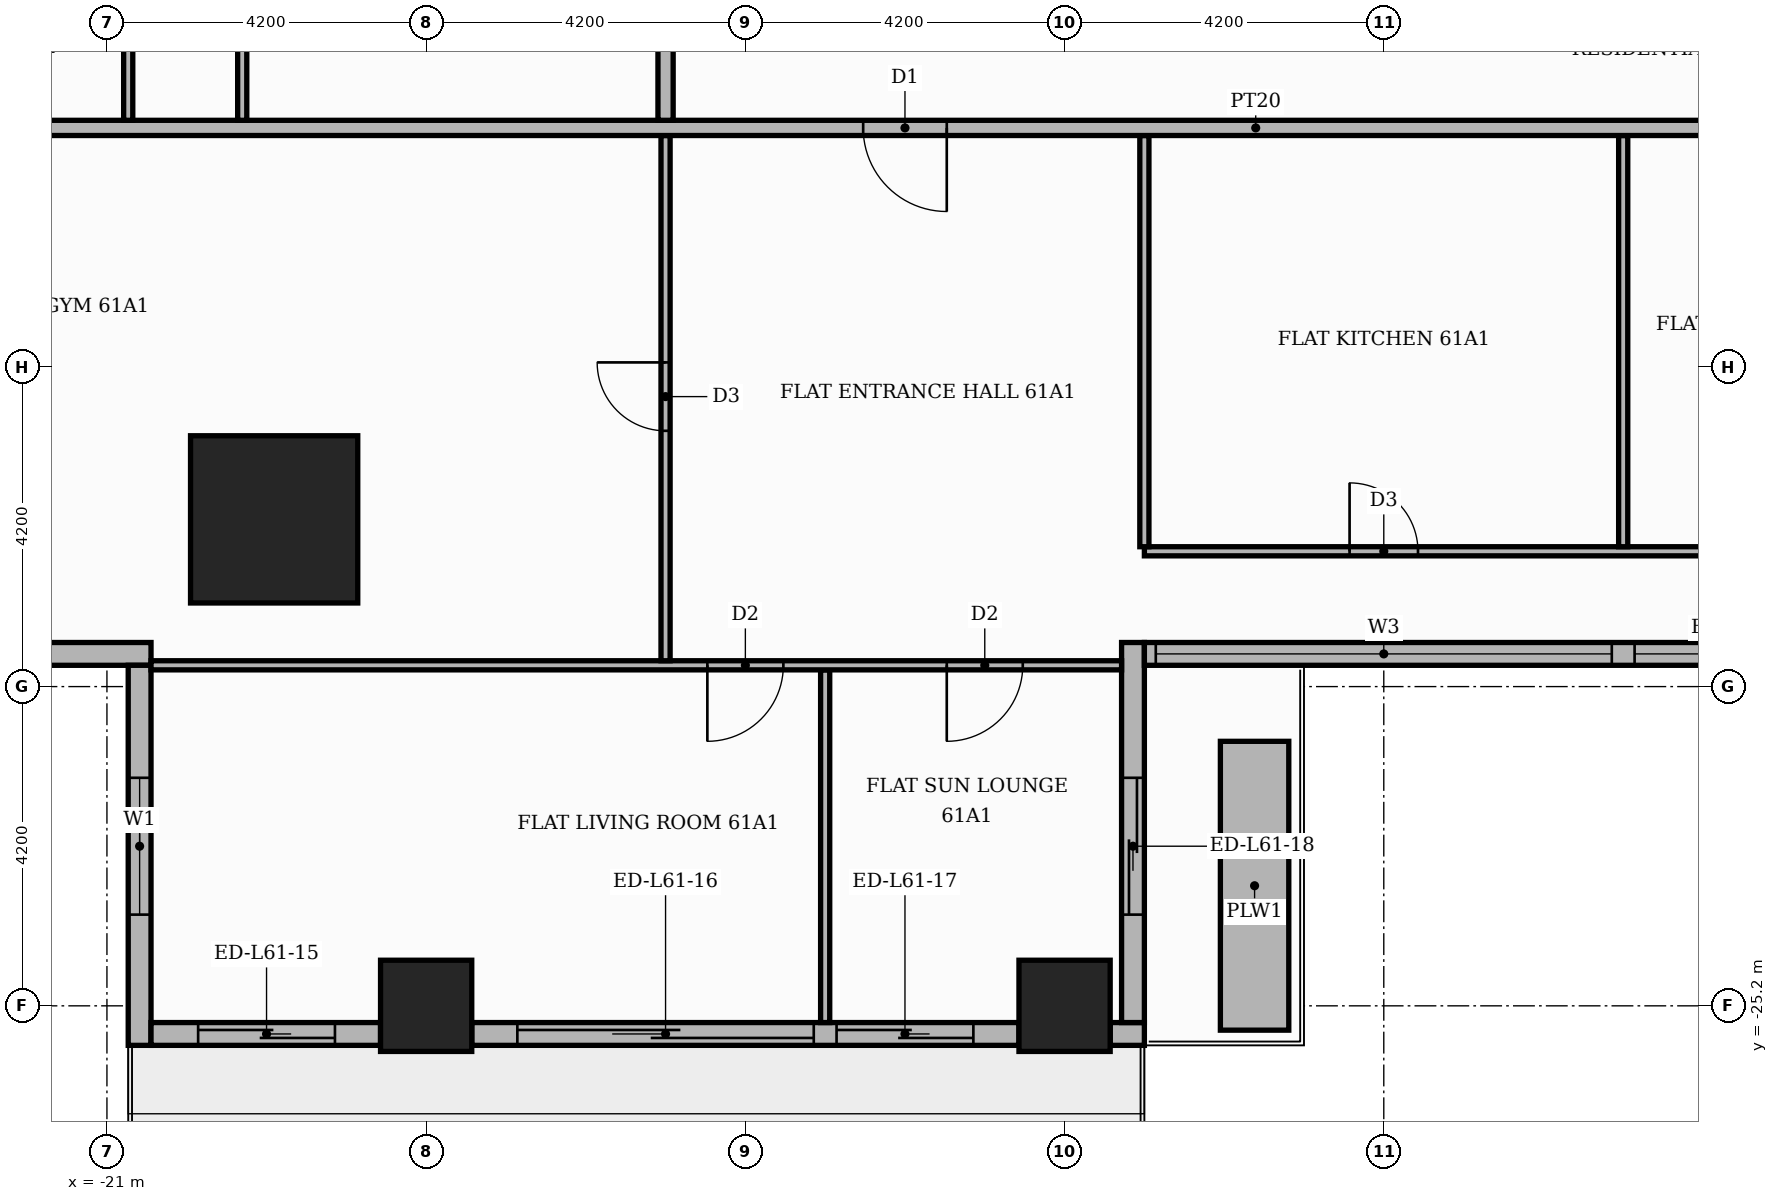
"""IFC4 building model, lengths in metres.
Left out: names, types, materials, properties, quantities, classifications, styles, units other than length and angle.
Written with IfcOpenShell. Run it as: python <this file> out.ifc"""

import sys

from ifc_helpers import new_model, si_unit, direction, frame, frame_2d, origin, origin_2d, place, context, subcontext, project, spatial, rectangle, extrude, element, fill, save


model = new_model("IFC4")
c1 = context("Model", 3, precision=1e-05, world=origin(), true_north=direction((0.0, 1.0)))
c2 = subcontext(c1, "Body", "Model", "MODEL_VIEW")
j1 = project(units=[si_unit("LENGTHUNIT", "METRE"), si_unit("PLANEANGLEUNIT", "RADIAN")], contexts=[c1])
p1 = place(None, origin())
s1 = spatial("IfcSite", under=j1, at=p1, CompositionType="ELEMENT")
p2 = place(p1, origin())
s2 = spatial("IfcBuilding", under=s1, at=p2, CompositionType="ELEMENT")
p3 = place(p2, frame((0.0, 0.0, 256.2)))
s3 = spatial("IfcBuildingStorey", under=s2, at=p3, CompositionType="ELEMENT", Elevation=256.2)
p4 = place(p3, frame((-18.8, -18.8, 0.0), z_axis=(0.0, 0.0, 1.0), x_axis=(1.0, 0.0, 0.0)))
e1 = element("IfcColumn", 1, at=p4, inside=s3, PredefinedType="COLUMN", context=c2, shape_type="SweptSolid", body=[
    extrude(rectangle(XDim=2.2, YDim=2.2, at=origin_2d()), origin(), (0.0, 0.0, 1.0), 3.9),
])
for number, where, z_axis, x_axis in (
    (2, (-8.4, -25.2, 0.0), (0.0, 0.0, 1.0), (1.0, 0.0, 0.0)),
    (3, (-16.8, -25.2, 0.0), (0.0, 0.0, 1.0), (1.0, 0.0, 0.0)),
):
    element("IfcColumn", number, at=place(p3, frame(where, z_axis=z_axis, x_axis=x_axis)), inside=s3, PredefinedType="COLUMN", context=c2, shape_type="SweptSolid", body=[
        extrude(rectangle(XDim=1.2, YDim=1.2, at=origin_2d()), origin(), (0.0, 0.0, 1.0), 3.9),
    ])
p5 = place(p3, frame((-25.42, -20.57, 0.0), z_axis=(0.0, 0.0, 1.0), x_axis=(1.0, 0.0, 0.0)))
e4 = element("IfcWall", 4, at=p5, inside=s3, PredefinedType="STANDARD", context=c2, shape_type="SweptSolid", body=[
    extrude(rectangle(XDim=5.0, YDim=0.3, at=frame_2d((2.5, 0.0))), origin(), (0.0, 0.0, 1.0), 3.48),
])
p6 = place(p5, frame((1.42, 0.0, 0.9)))
e5 = element("IfcOpeningElement", 5, at=p6, cuts=e4, PredefinedType="OPENING", context=c2, shape_type="SweptSolid", body=[
    extrude(rectangle(XDim=1.8, YDim=2.1, at=frame_2d((0.9, 1.05))), frame((0.0, 0.16, 0.0), z_axis=(0.0, -1.0, 0.0), x_axis=(1.0, 0.0, 0.0)), (0.0, 0.0, 1.0), 0.32),
])
p7 = place(p3, frame((-20.57, -20.72, 0.0), z_axis=(0.0, 0.0, 1.0), x_axis=(0.0, -1.0, 0.0)))
e6 = element("IfcWall", 6, at=p7, inside=s3, PredefinedType="STANDARD", context=c2, shape_type="SweptSolid", body=[
    extrude(rectangle(XDim=5.0, YDim=0.3, at=frame_2d((2.5, 0.0))), origin(), (0.0, 0.0, 1.0), 3.48),
])
p8 = place(p7, frame((1.48, 0.0, 0.9)))
e7 = element("IfcOpeningElement", 7, at=p8, cuts=e6, PredefinedType="OPENING", context=c2, shape_type="SweptSolid", body=[
    extrude(rectangle(XDim=1.8, YDim=2.1, at=frame_2d((0.9, 1.05))), frame((0.0, 0.16, 0.0), z_axis=(0.0, -1.0, 0.0), x_axis=(1.0, 0.0, 0.0)), (0.0, 0.0, 1.0), 0.32),
])
p9 = place(p3, frame((-20.42, -25.57, 0.0), z_axis=(0.0, 0.0, 1.0), x_axis=(1.0, 0.0, 0.0)))
e8 = element("IfcWall", 8, at=p9, inside=s3, PredefinedType="STANDARD", context=c2, shape_type="SweptSolid", body=[
    extrude(rectangle(XDim=3.02, YDim=0.3, at=frame_2d((1.51, 0.0))), origin(), (0.0, 0.0, 1.0), 3.48),
])
p10 = place(p9, frame((0.62, 0.0, 0.0)))
e9 = element("IfcOpeningElement", 9, at=p10, cuts=e8, PredefinedType="OPENING", context=c2, shape_type="SweptSolid", body=[
    extrude(rectangle(XDim=1.8, YDim=2.4, at=frame_2d((0.9, 1.2))), frame((0.0, 0.16, 0.0), z_axis=(0.0, -1.0, 0.0), x_axis=(1.0, 0.0, 0.0)), (0.0, 0.0, 1.0), 0.32),
])
p11 = place(p3, frame((-16.2, -25.57, 0.0), z_axis=(0.0, 0.0, 1.0), x_axis=(1.0, 0.0, 0.0)))
e10 = element("IfcWall", 10, at=p11, inside=s3, PredefinedType="STANDARD", context=c2, shape_type="SweptSolid", body=[
    extrude(rectangle(XDim=7.2, YDim=0.3, at=frame_2d((3.6, 0.0))), origin(), (0.0, 0.0, 1.0), 3.48),
])
p12 = place(p11, frame((0.6, 0.0, 0.0)))
e11 = element("IfcOpeningElement", 11, at=p12, cuts=e10, PredefinedType="OPENING", context=c2, shape_type="SweptSolid", body=[
    extrude(rectangle(XDim=3.9, YDim=2.4, at=frame_2d((1.95, 1.2))), frame((0.0, 0.16, 0.0), z_axis=(0.0, -1.0, 0.0), x_axis=(1.0, 0.0, 0.0)), (0.0, 0.0, 1.0), 0.32),
])
p13 = place(p11, frame((4.8, 0.0, 0.0)))
e12 = element("IfcOpeningElement", 12, at=p13, cuts=e10, PredefinedType="OPENING", context=c2, shape_type="SweptSolid", body=[
    extrude(rectangle(XDim=1.8, YDim=2.4, at=frame_2d((0.9, 1.2))), frame((0.0, 0.16, 0.0), z_axis=(0.0, -1.0, 0.0), x_axis=(1.0, 0.0, 0.0)), (0.0, 0.0, 1.0), 0.32),
])
p14 = place(p3, frame((-7.8, -25.57, 0.0), z_axis=(0.0, 0.0, 1.0), x_axis=(1.0, 0.0, 0.0)))
e13 = element("IfcWall", 13, at=p14, inside=s3, PredefinedType="STANDARD", context=c2, shape_type="SweptSolid", body=[
    extrude(rectangle(XDim=0.45, YDim=0.3, at=frame_2d((0.225, 0.0))), origin(), (0.0, 0.0, 1.0), 3.48),
])
p15 = place(p3, frame((-7.5, -25.42, 0.0), z_axis=(0.0, 0.0, 1.0), x_axis=(0.0, 1.0, 0.0)))
e14 = element("IfcWall", 14, at=p15, inside=s3, PredefinedType="STANDARD", context=c2, shape_type="SweptSolid", body=[
    extrude(rectangle(XDim=5.0, YDim=0.3, at=frame_2d((2.5, 0.0))), origin(), (0.0, 0.0, 1.0), 3.48),
])
p16 = place(p15, frame((1.42, 0.0, 0.0)))
e15 = element("IfcOpeningElement", 15, at=p16, cuts=e14, PredefinedType="OPENING", context=c2, shape_type="SweptSolid", body=[
    extrude(rectangle(XDim=1.8, YDim=2.4, at=frame_2d((0.9, 1.2))), frame((0.0, 0.16, 0.0), z_axis=(0.0, -1.0, 0.0), x_axis=(1.0, 0.0, 0.0)), (0.0, 0.0, 1.0), 0.32),
])
p17 = place(p3, frame((-7.35, -20.57, 0.0), z_axis=(0.0, 0.0, 1.0), x_axis=(1.0, 0.0, 0.0)))
e16 = element("IfcWall", 16, at=p17, inside=s3, PredefinedType="STANDARD", context=c2, shape_type="SweptSolid", body=[
    extrude(rectangle(XDim=15.0, YDim=0.3, at=frame_2d((7.5, 0.0))), origin(), (0.0, 0.0, 1.0), 3.48),
])
p18 = place(p17, frame((0.15, 0.0, 0.9)))
e17 = element("IfcOpeningElement", 17, at=p18, cuts=e16, PredefinedType="OPENING", context=c2, shape_type="SweptSolid", body=[
    extrude(rectangle(XDim=6.0, YDim=2.1, at=frame_2d((3.0, 1.05))), frame((0.0, 0.16, 0.0), z_axis=(0.0, -1.0, 0.0), x_axis=(1.0, 0.0, 0.0)), (0.0, 0.0, 1.0), 0.32),
])
p19 = place(p17, frame((6.45, 0.0, 0.9)))
e18 = element("IfcOpeningElement", 18, at=p19, cuts=e16, PredefinedType="OPENING", context=c2, shape_type="SweptSolid", body=[
    extrude(rectangle(XDim=6.0, YDim=2.1, at=frame_2d((3.0, 1.05))), frame((0.0, 0.16, 0.0), z_axis=(0.0, -1.0, 0.0), x_axis=(1.0, 0.0, 0.0)), (0.0, 0.0, 1.0), 0.32),
])
p20 = place(p17, frame((12.75, 0.0, 0.9)))
e19 = element("IfcOpeningElement", 19, at=p20, cuts=e16, PredefinedType="OPENING", context=c2, shape_type="SweptSolid", body=[
    extrude(rectangle(XDim=1.8, YDim=2.1, at=frame_2d((0.9, 1.05))), frame((0.0, 0.16, 0.0), z_axis=(0.0, -1.0, 0.0), x_axis=(1.0, 0.0, 0.0)), (0.0, 0.0, 1.0), 0.32),
])
p21 = place(p3, frame((-5.9, -25.52, 0.0), z_axis=(0.0, 0.0, 1.0), x_axis=(0.0, 1.0, 0.0)))
e20 = element("IfcWall", 20, at=p21, inside=s3, PredefinedType="MOVABLE", context=c2, shape_type="SweptSolid", body=[
    extrude(rectangle(XDim=3.8, YDim=0.9, at=frame_2d((1.9, 0.0))), origin(), (0.0, 0.0, 1.0), 0.6),
])
p22 = place(p3, frame((-11.55, -25.42, 0.0), z_axis=(0.0, 0.0, 1.0), x_axis=(0.0, 1.0, 0.0)))
e21 = element("IfcWall", 21, at=p22, inside=s3, PredefinedType="PARTITIONING", context=c2, shape_type="SweptSolid", body=[
    extrude(rectangle(XDim=4.64, YDim=0.12, at=frame_2d((2.32, 0.0))), origin(), (0.0, 0.0, 1.0), 3.48),
])
p23 = place(p3, frame((-20.42, -20.72, 0.0), z_axis=(0.0, 0.0, 1.0), x_axis=(1.0, 0.0, 0.0)))
e22 = element("IfcWall", 22, at=p23, inside=s3, PredefinedType="PARTITIONING", context=c2, shape_type="SweptSolid", body=[
    extrude(rectangle(XDim=12.77, YDim=0.12, at=frame_2d((6.385, 0.0))), origin(), (0.0, 0.0, 1.0), 3.48),
])
p24 = place(p23, frame((7.32, 0.0, 0.0)))
e23 = element("IfcOpeningElement", 23, at=p24, cuts=e22, PredefinedType="OPENING", context=c2, shape_type="SweptSolid", body=[
    extrude(rectangle(XDim=1.0, YDim=2.1, at=frame_2d((0.5, 1.05))), frame((0.0, 0.07, 0.0), z_axis=(0.0, -1.0, 0.0), x_axis=(1.0, 0.0, 0.0)), (0.0, 0.0, 1.0), 0.14),
])
p25 = place(p23, frame((10.47, 0.0, 0.0)))
e24 = element("IfcOpeningElement", 24, at=p25, cuts=e22, PredefinedType="OPENING", context=c2, shape_type="SweptSolid", body=[
    extrude(rectangle(XDim=1.0, YDim=2.1, at=frame_2d((0.5, 1.05))), frame((0.0, 0.07, 0.0), z_axis=(0.0, -1.0, 0.0), x_axis=(1.0, 0.0, 0.0)), (0.0, 0.0, 1.0), 0.14),
])
p26 = place(p3, frame((-13.65, -20.66, 0.0), z_axis=(0.0, 0.0, 1.0), x_axis=(0.0, 1.0, 0.0)))
e25 = element("IfcWall", 25, at=p26, inside=s3, PredefinedType="PARTITIONING", context=c2, shape_type="SweptSolid", body=[
    extrude(rectangle(XDim=6.91, YDim=0.12, at=frame_2d((3.455, 0.0))), origin(), (0.0, 0.0, 1.0), 3.48),
])
p27 = place(p26, frame((3.025, 0.0, 0.0)))
e26 = element("IfcOpeningElement", 26, at=p27, cuts=e25, PredefinedType="OPENING", context=c2, shape_type="SweptSolid", body=[
    extrude(rectangle(XDim=0.9, YDim=2.1, at=frame_2d((0.45, 1.05))), frame((0.0, 0.07, 0.0), z_axis=(0.0, -1.0, 0.0), x_axis=(1.0, 0.0, 0.0)), (0.0, 0.0, 1.0), 0.14),
])
p28 = place(p3, frame((-7.35, -19.22, 0.0), z_axis=(0.0, 0.0, 1.0), x_axis=(1.0, 0.0, 0.0)))
e27 = element("IfcWall", 27, at=p28, inside=s3, PredefinedType="PARTITIONING", context=c2, shape_type="SweptSolid", body=[
    extrude(rectangle(XDim=20.9, YDim=0.12, at=frame_2d((10.45, 0.0))), origin(), (0.0, 0.0, 1.0), 3.48),
])
p29 = place(p28, frame((2.7, 0.0, 0.0)))
e28 = element("IfcOpeningElement", 28, at=p29, cuts=e27, PredefinedType="OPENING", context=c2, shape_type="SweptSolid", body=[
    extrude(rectangle(XDim=0.9, YDim=2.1, at=frame_2d((0.45, 1.05))), frame((0.0, 0.07, 0.0), z_axis=(0.0, -1.0, 0.0), x_axis=(1.0, 0.0, 0.0)), (0.0, 0.0, 1.0), 0.14),
])
p30 = place(p28, frame((7.95, 0.0, 0.0)))
e29 = element("IfcOpeningElement", 29, at=p30, cuts=e27, PredefinedType="OPENING", context=c2, shape_type="SweptSolid", body=[
    extrude(rectangle(XDim=0.9, YDim=2.1, at=frame_2d((0.45, 1.05))), frame((0.0, 0.07, 0.0), z_axis=(0.0, -1.0, 0.0), x_axis=(1.0, 0.0, 0.0)), (0.0, 0.0, 1.0), 0.14),
])
p31 = place(p28, frame((13.05, 0.0, 0.0)))
e30 = element("IfcOpeningElement", 30, at=p31, cuts=e27, PredefinedType="OPENING", context=c2, shape_type="SweptSolid", body=[
    extrude(rectangle(XDim=0.9, YDim=2.1, at=frame_2d((0.45, 1.05))), frame((0.0, 0.07, 0.0), z_axis=(0.0, -1.0, 0.0), x_axis=(1.0, 0.0, 0.0)), (0.0, 0.0, 1.0), 0.14),
])
p32 = place(p28, frame((17.25, 0.0, 0.0)))
e31 = element("IfcOpeningElement", 31, at=p32, cuts=e27, PredefinedType="OPENING", context=c2, shape_type="SweptSolid", body=[
    extrude(rectangle(XDim=0.9, YDim=2.1, at=frame_2d((0.45, 1.05))), frame((0.0, 0.07, 0.0), z_axis=(0.0, -1.0, 0.0), x_axis=(1.0, 0.0, 0.0)), (0.0, 0.0, 1.0), 0.14),
])
p33 = place(p28, frame((19.5, 0.0, 0.0)))
e32 = element("IfcOpeningElement", 32, at=p33, cuts=e27, PredefinedType="OPENING", context=c2, shape_type="SweptSolid", body=[
    extrude(rectangle(XDim=0.9, YDim=2.1, at=frame_2d((0.45, 1.05))), frame((0.0, 0.07, 0.0), z_axis=(0.0, -1.0, 0.0), x_axis=(1.0, 0.0, 0.0)), (0.0, 0.0, 1.0), 0.14),
])
for number, where, z_axis, x_axis in (
    (33, (-7.35, -19.16, 0.0), (0.0, 0.0, 1.0), (0.0, 1.0, 0.0)),
    (34, (-1.05, -19.16, 0.0), (0.0, 0.0, 1.0), (0.0, 1.0, 0.0)),
):
    element("IfcWall", number, at=place(p3, frame(where, z_axis=z_axis, x_axis=x_axis)), inside=s3, PredefinedType="PARTITIONING", context=c2, shape_type="SweptSolid", body=[
        extrude(rectangle(XDim=5.41, YDim=0.12, at=frame_2d((2.705, 0.0))), origin(), (0.0, 0.0, 1.0), 3.48),
    ])
p34 = place(p3, frame((-25.42, -13.65, 0.0), z_axis=(0.0, 0.0, 1.0), x_axis=(1.0, 0.0, 0.0)))
e35 = element("IfcWall", 35, at=p34, inside=s3, PredefinedType="PARTITIONING", context=c2, shape_type="SweptSolid", body=[
    extrude(rectangle(XDim=39.07, YDim=0.2, at=frame_2d((19.535, 0.0))), origin(), (0.0, 0.0, 1.0), 3.48),
])
p35 = place(p34, frame((14.37, 0.0, 0.0)))
e36 = element("IfcOpeningElement", 36, at=p35, cuts=e35, PredefinedType="OPENING", context=c2, shape_type="SweptSolid", body=[
    extrude(rectangle(XDim=1.1, YDim=2.4, at=frame_2d((0.55, 1.2))), frame((0.0, 0.11, 0.0), z_axis=(0.0, -1.0, 0.0), x_axis=(1.0, 0.0, 0.0)), (0.0, 0.0, 1.0), 0.22),
])
p36 = place(p3, frame((-20.72, -13.55, 0.0), z_axis=(0.0, 0.0, 1.0), x_axis=(0.0, 1.0, 0.0)))
e37 = element("IfcWall", 37, at=p36, inside=s3, PredefinedType="PARTITIONING", context=c2, shape_type="SweptSolid", body=[
    extrude(rectangle(XDim=1.94, YDim=0.12, at=frame_2d((0.97, 0.0))), origin(), (0.0, 0.0, 1.0), 3.48),
])
p37 = place(p3, frame((-19.22, -13.55, 0.0), z_axis=(0.0, 0.0, 1.0), x_axis=(0.0, 1.0, 0.0)))
e38 = element("IfcWall", 38, at=p37, inside=s3, PredefinedType="PARTITIONING", context=c2, shape_type="SweptSolid", body=[
    extrude(rectangle(XDim=4.04, YDim=0.12, at=frame_2d((2.02, 0.0))), origin(), (0.0, 0.0, 1.0), 3.48),
])
p38 = place(p37, frame((1.55, 0.0, 0.0)))
e39 = element("IfcOpeningElement", 39, at=p38, cuts=e38, PredefinedType="OPENING", context=c2, shape_type="SweptSolid", body=[
    extrude(rectangle(XDim=0.9, YDim=2.1, at=frame_2d((0.45, 1.05))), frame((0.0, 0.07, 0.0), z_axis=(0.0, -1.0, 0.0), x_axis=(1.0, 0.0, 0.0)), (0.0, 0.0, 1.0), 0.14),
])
p39 = place(p3, frame((-13.65, -13.55, 0.0), z_axis=(0.0, 0.0, 1.0), x_axis=(0.0, 1.0, 0.0)))
e40 = element("IfcWall", 40, at=p39, inside=s3, PredefinedType="PARTITIONING", context=c2, shape_type="SweptSolid", body=[
    extrude(rectangle(XDim=2.45, YDim=0.2, at=frame_2d((1.225, 0.0))), origin(), (0.0, 0.0, 1.0), 3.48),
])
p40 = place(p8, origin())
e41 = element("IfcWindow", 41, at=p40, inside=s3, PartitioningType="SINGLE_PANEL", PredefinedType="WINDOW", context=c2, shape_type="SweptSolid", body=[
    extrude(rectangle(XDim=1.8, YDim=2.1, at=frame_2d((0.9, 1.05))), frame((0.0, 0.03, 0.0), z_axis=(0.0, -1.0, 0.0), x_axis=(1.0, 0.0, 0.0)), (0.0, 0.0, 1.0), 0.06),
])
fill(e7, e41)
p41 = place(p10, origin())
e42 = element("IfcDoor", 42, at=p41, inside=s3, OperationType="SLIDING_TO_RIGHT", PredefinedType="DOOR", context=c2, shape_type="SweptSolid", body=[
    extrude(rectangle(XDim=1.8, YDim=2.4, at=frame_2d((0.9, 1.2))), frame((0.0, 0.025, 0.0), z_axis=(0.0, -1.0, 0.0), x_axis=(1.0, 0.0, 0.0)), (0.0, 0.0, 1.0), 0.05),
])
fill(e9, e42)
p42 = place(p12, origin())
e43 = element("IfcDoor", 43, at=p42, inside=s3, OperationType="SLIDING_TO_LEFT", PredefinedType="DOOR", context=c2, shape_type="SweptSolid", body=[
    extrude(rectangle(XDim=3.9, YDim=2.4, at=frame_2d((1.95, 1.2))), frame((0.0, 0.025, 0.0), z_axis=(0.0, -1.0, 0.0), x_axis=(1.0, 0.0, 0.0)), (0.0, 0.0, 1.0), 0.05),
])
fill(e11, e43)
p43 = place(p13, origin())
e44 = element("IfcDoor", 44, at=p43, inside=s3, OperationType="SLIDING_TO_RIGHT", PredefinedType="DOOR", context=c2, shape_type="SweptSolid", body=[
    extrude(rectangle(XDim=1.8, YDim=2.4, at=frame_2d((0.9, 1.2))), frame((0.0, 0.025, 0.0), z_axis=(0.0, -1.0, 0.0), x_axis=(1.0, 0.0, 0.0)), (0.0, 0.0, 1.0), 0.05),
])
fill(e12, e44)
p44 = place(p16, origin())
e45 = element("IfcDoor", 45, at=p44, inside=s3, OperationType="SLIDING_TO_LEFT", PredefinedType="DOOR", context=c2, shape_type="SweptSolid", body=[
    extrude(rectangle(XDim=1.8, YDim=2.4, at=frame_2d((0.9, 1.2))), frame((0.0, 0.025, 0.0), z_axis=(0.0, -1.0, 0.0), x_axis=(1.0, 0.0, 0.0)), (0.0, 0.0, 1.0), 0.05),
])
fill(e15, e45)
p45 = place(p18, origin())
e46 = element("IfcWindow", 46, at=p45, inside=s3, PartitioningType="SINGLE_PANEL", PredefinedType="WINDOW", context=c2, shape_type="SweptSolid", body=[
    extrude(rectangle(XDim=6.0, YDim=2.1, at=frame_2d((3.0, 1.05))), frame((0.0, 0.03, 0.0), z_axis=(0.0, -1.0, 0.0), x_axis=(1.0, 0.0, 0.0)), (0.0, 0.0, 1.0), 0.06),
])
fill(e17, e46)
p46 = place(p19, origin())
e47 = element("IfcWindow", 47, at=p46, inside=s3, PartitioningType="SINGLE_PANEL", PredefinedType="WINDOW", context=c2, shape_type="SweptSolid", body=[
    extrude(rectangle(XDim=6.0, YDim=2.1, at=frame_2d((3.0, 1.05))), frame((0.0, 0.03, 0.0), z_axis=(0.0, -1.0, 0.0), x_axis=(1.0, 0.0, 0.0)), (0.0, 0.0, 1.0), 0.06),
])
fill(e18, e47)
p47 = place(p35, frame((1.1, 0.0, 0.0), z_axis=(0.0, 0.0, 1.0), x_axis=(-1.0, 0.0, 0.0)))
e48 = element("IfcDoor", 48, at=p47, inside=s3, OperationType="SINGLE_SWING_RIGHT", PredefinedType="DOOR", context=c2, shape_type="SweptSolid", body=[
    extrude(rectangle(XDim=1.1, YDim=2.4, at=frame_2d((0.55, 1.2))), frame((0.0, 0.025, 0.0), z_axis=(0.0, -1.0, 0.0), x_axis=(1.0, 0.0, 0.0)), (0.0, 0.0, 1.0), 0.05),
])
fill(e36, e48)
p48 = place(p27, origin())
e49 = element("IfcDoor", 49, at=p48, inside=s3, OperationType="SINGLE_SWING_RIGHT", PredefinedType="DOOR", context=c2, shape_type="SweptSolid", body=[
    extrude(rectangle(XDim=0.9, YDim=2.1, at=frame_2d((0.45, 1.05))), frame((0.0, 0.025, 0.0), z_axis=(0.0, -1.0, 0.0), x_axis=(1.0, 0.0, 0.0)), (0.0, 0.0, 1.0), 0.05),
])
fill(e26, e49)
p49 = place(p29, origin())
e50 = element("IfcDoor", 50, at=p49, inside=s3, OperationType="SINGLE_SWING_LEFT", PredefinedType="DOOR", context=c2, shape_type="SweptSolid", body=[
    extrude(rectangle(XDim=0.9, YDim=2.1, at=frame_2d((0.45, 1.05))), frame((0.0, 0.025, 0.0), z_axis=(0.0, -1.0, 0.0), x_axis=(1.0, 0.0, 0.0)), (0.0, 0.0, 1.0), 0.05),
])
fill(e28, e50)
p50 = place(p24, frame((1.0, 0.0, 0.0), z_axis=(0.0, 0.0, 1.0), x_axis=(-1.0, 0.0, 0.0)))
e51 = element("IfcDoor", 51, at=p50, inside=s3, OperationType="SINGLE_SWING_LEFT", PredefinedType="DOOR", context=c2, shape_type="SweptSolid", body=[
    extrude(rectangle(XDim=1.0, YDim=2.1, at=frame_2d((0.5, 1.05))), frame((0.0, 0.025, 0.0), z_axis=(0.0, -1.0, 0.0), x_axis=(1.0, 0.0, 0.0)), (0.0, 0.0, 1.0), 0.05),
])
fill(e23, e51)
p51 = place(p25, frame((1.0, 0.0, 0.0), z_axis=(0.0, 0.0, 1.0), x_axis=(-1.0, 0.0, 0.0)))
e52 = element("IfcDoor", 52, at=p51, inside=s3, OperationType="SINGLE_SWING_LEFT", PredefinedType="DOOR", context=c2, shape_type="SweptSolid", body=[
    extrude(rectangle(XDim=1.0, YDim=2.1, at=frame_2d((0.5, 1.05))), frame((0.0, 0.025, 0.0), z_axis=(0.0, -1.0, 0.0), x_axis=(1.0, 0.0, 0.0)), (0.0, 0.0, 1.0), 0.05),
])
fill(e24, e52)
save(model, sys.argv[1])
